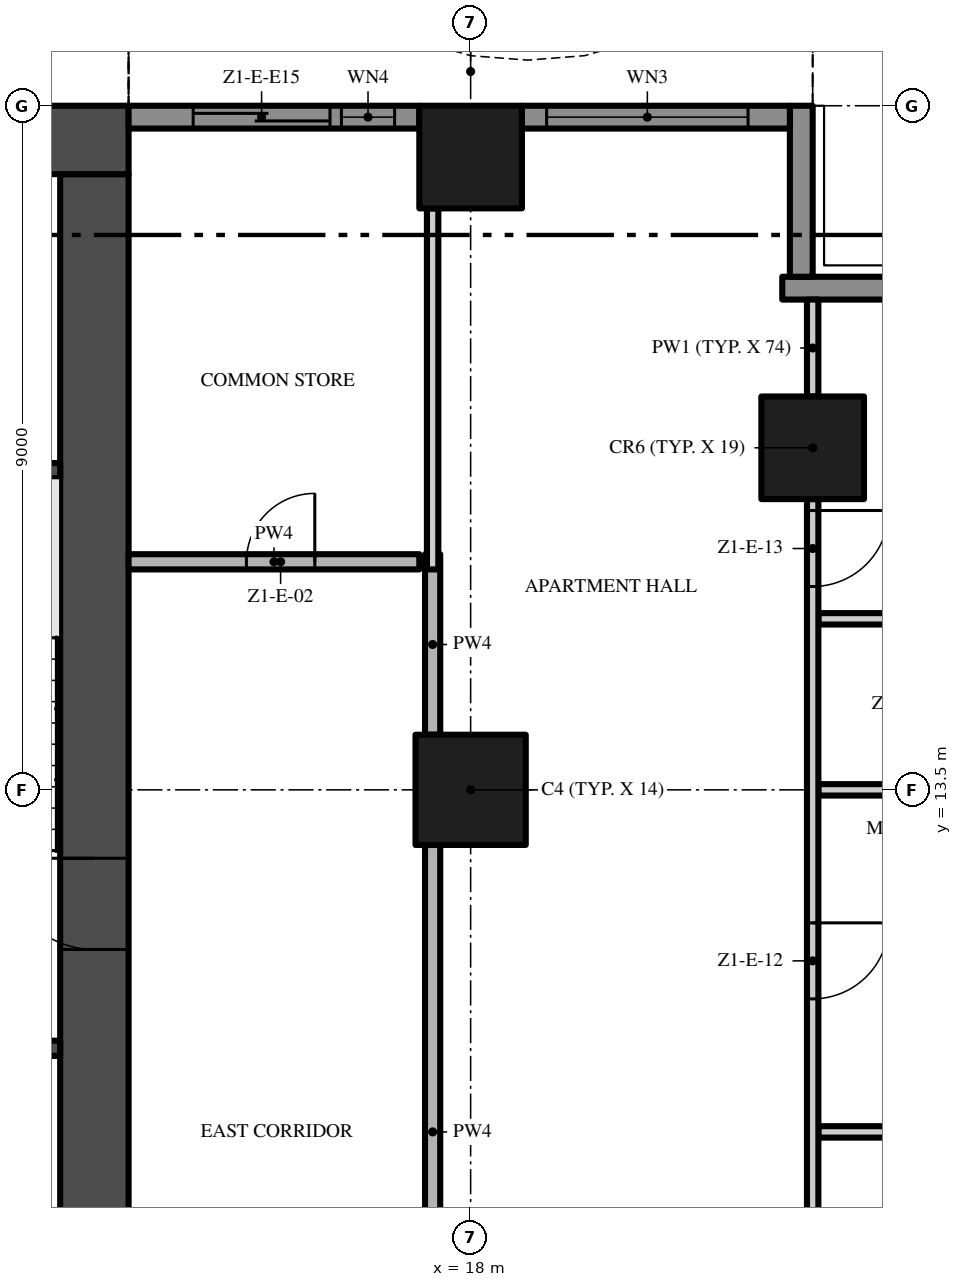
"""IFC4 building model, lengths in metres.
Left out: names, types, materials, properties, quantities, classifications, styles, units other than length and angle.
Written with IfcOpenShell. Run it as: python <this file> out.ifc"""

import sys

from ifc_helpers import new_model, si_unit, direction, frame, frame_2d, origin, origin_2d, place, context, subcontext, project, spatial, polyline, rectangle, outline, extrude, element, fill, save


model = new_model("IFC4")
c1 = context("Model", 3, precision=1e-05, world=origin(), true_north=direction((0.0, 1.0)))
c2 = subcontext(c1, "Body", "Model", "MODEL_VIEW")
j1 = project(units=[si_unit("LENGTHUNIT", "METRE"), si_unit("PLANEANGLEUNIT", "RADIAN")], contexts=[c1])
p1 = place(None, origin())
s1 = spatial("IfcSite", under=j1, at=p1, CompositionType="ELEMENT")
p2 = place(p1, origin())
s2 = spatial("IfcBuilding", under=s1, at=p2, CompositionType="ELEMENT")
p3 = place(p2, frame((0.0, 0.0, 60.6)))
s3 = spatial("IfcBuildingStorey", under=s2, at=p3, CompositionType="ELEMENT", Elevation=60.6)
p4 = place(p3, frame((13.05, 5.4, -0.3), z_axis=(0.0, 0.0, 1.0), x_axis=(0.0, 1.0, 0.0)))
e1 = element("IfcWall", 1, at=p4, inside=s3, PredefinedType="SHEAR", context=c2, shape_type="SweptSolid", body=[
    extrude(rectangle(XDim=16.2, YDim=0.9, at=frame_2d((8.1, 0.0))), origin(), (0.0, 0.0, 1.0), 3.8),
])
p5 = place(p4, frame((6.0, 0.0, 0.3)))
e2 = element("IfcOpeningElement", 2, at=p5, cuts=e1, PredefinedType="OPENING", context=c2, shape_type="SweptSolid", body=[
    extrude(rectangle(XDim=1.2, YDim=2.2, at=frame_2d((0.6, 1.1))), frame((0.0, 0.46, 0.0), z_axis=(0.0, -1.0, 0.0), x_axis=(1.0, 0.0, 0.0)), (0.0, 0.0, 1.0), 0.92),
])
p6 = place(p3, frame((13.5, 22.05, -0.3), z_axis=(0.0, 0.0, 1.0), x_axis=(-1.0, 0.0, 0.0)))
e3 = element("IfcWall", 3, at=p6, inside=s3, PredefinedType="SHEAR", context=c2, shape_type="SweptSolid", body=[
    extrude(rectangle(XDim=27.0, YDim=0.9, at=frame_2d((13.5, 0.0))), origin(), (0.0, 0.0, 1.0), 3.8),
])
p7 = place(p3, frame((18.0, 13.5, 0.0), z_axis=(0.0, 0.0, 1.0), x_axis=(1.0, 0.0, 0.0)))
e4 = element("IfcColumn", 4, at=p7, inside=s3, PredefinedType="COLUMN", context=c2, shape_type="SweptSolid", body=[
    extrude(rectangle(XDim=1.45, YDim=1.45, at=origin_2d()), origin(), (0.0, 0.0, 1.0), 3.5),
])
for number, where, z_axis, x_axis in (
    (5, (18.0, 21.825, 0.0), (0.0, 0.0, 1.0), (1.0, 0.0, 0.0)),
    (6, (22.5, 18.0, 0.0), (0.0, 0.0, 1.0), (1.0, 0.0, 0.0)),
):
    element("IfcColumn", number, at=place(p3, frame(where, z_axis=z_axis, x_axis=x_axis)), inside=s3, PredefinedType="COLUMN", context=c2, shape_type="SweptSolid", body=[
        extrude(rectangle(XDim=1.35, YDim=1.35, at=origin_2d()), origin(), (0.0, 0.0, 1.0), 3.5),
    ])
p8 = place(p3, frame((22.1, 20.1, 0.0), z_axis=(0.0, 0.0, 1.0), x_axis=(1.0, 0.0, 0.0)))
e7 = element("IfcWall", 7, at=p8, inside=s3, PredefinedType="SOLIDWALL", context=c2, shape_type="SweptSolid", body=[
    extrude(rectangle(XDim=2.35, YDim=0.3, at=frame_2d((1.175, 0.0))), origin(), (0.0, 0.0, 1.0), 3.5),
])
p9 = place(p3, frame((22.35, 22.5, 0.0), z_axis=(0.0, 0.0, 1.0), x_axis=(0.0, -1.0, 0.0)))
e8 = element("IfcWall", 8, at=p9, inside=s3, PredefinedType="SOLIDWALL", context=c2, shape_type="SweptSolid", body=[
    extrude(rectangle(XDim=2.25, YDim=0.3, at=frame_2d((1.125, 0.0))), origin(), (0.0, 0.0, 1.0), 3.5),
])
p10 = place(p3, frame((18.675, 22.35, 0.0), z_axis=(0.0, 0.0, 1.0), x_axis=(1.0, 0.0, 0.0)))
e9 = element("IfcWall", 9, at=p10, inside=s3, PredefinedType="SOLIDWALL", context=c2, shape_type="SweptSolid", body=[
    extrude(rectangle(XDim=3.525, YDim=0.3, at=frame_2d((1.762, 0.0))), origin(), (0.0, 0.0, 1.0), 3.5),
])
p11 = place(p10, frame((0.325, 0.0, 0.45)))
e10 = element("IfcOpeningElement", 10, at=p11, cuts=e9, PredefinedType="OPENING", context=c2, shape_type="SweptSolid", body=[
    extrude(rectangle(XDim=2.65, YDim=2.65, at=frame_2d((1.325, 1.325))), frame((0.0, 0.16, 0.0), z_axis=(0.0, -1.0, 0.0), x_axis=(1.0, 0.0, 0.0)), (0.0, 0.0, 1.0), 0.32),
])
p12 = place(p3, frame((13.5, 22.35, 0.0), z_axis=(0.0, 0.0, 1.0), x_axis=(1.0, 0.0, 0.0)))
e11 = element("IfcWall", 11, at=p12, inside=s3, PredefinedType="SOLIDWALL", context=c2, shape_type="SweptSolid", body=[
    extrude(rectangle(XDim=3.825, YDim=0.3, at=frame_2d((1.913, 0.0))), origin(), (0.0, 0.0, 1.0), 3.5),
])
p13 = place(p12, frame((2.8, 0.0, 0.45)))
e12 = element("IfcOpeningElement", 12, at=p13, cuts=e11, PredefinedType="OPENING", context=c2, shape_type="SweptSolid", body=[
    extrude(rectangle(XDim=0.7, YDim=2.65, at=frame_2d((0.35, 1.325))), frame((0.0, 0.16, 0.0), z_axis=(0.0, -1.0, 0.0), x_axis=(1.0, 0.0, 0.0)), (0.0, 0.0, 1.0), 0.32),
])
p14 = place(p12, frame((0.85, 0.0, 0.0)))
e13 = element("IfcOpeningElement", 13, at=p14, cuts=e11, PredefinedType="OPENING", context=c2, shape_type="SweptSolid", body=[
    extrude(rectangle(XDim=1.8, YDim=2.4, at=frame_2d((0.9, 1.2))), frame((0.0, 0.16, 0.0), z_axis=(0.0, -1.0, 0.0), x_axis=(1.0, 0.0, 0.0)), (0.0, 0.0, 1.0), 0.32),
])
p15 = place(p3, origin())
e14 = element("IfcWall", 14, at=p15, inside=s3, PredefinedType="USERDEFINED", context=c2, shape_type="SweptSolid", body=[
    extrude(outline(polyline([(22.5, 24.3), (21.0, 23.595), (19.5, 23.159), (18.75, 23.1), (18.0, 23.159), (16.5, 23.595), (15.0, 24.3), (13.5, 25.005), (13.394, 24.779), (14.894, 24.074), (16.411, 23.36), (17.955, 22.911), (18.75, 22.849), (19.545, 22.911), (21.089, 23.36), (22.606, 24.074), (22.5, 24.3)])), origin(), (0.0, 0.0, 1.0), 0.9),
])
for number, where, z_axis, x_axis in (
    (15, (9.65, 10.1, 0.0), (0.0, 0.0, 1.0), (1.0, 0.0, 0.0)),
    (16, (9.65, 17.7, 0.0), (0.0, 0.0, 1.0), (1.0, 0.0, 0.0)),
):
    element("IfcWall", number, at=place(p3, frame(where, z_axis=z_axis, x_axis=x_axis)), inside=s3, PredefinedType="SHEAR", context=c2, shape_type="SweptSolid", body=[
        extrude(rectangle(XDim=2.95, YDim=0.2, at=frame_2d((1.475, 0.0))), origin(), (0.0, 0.0, 1.0), 3.5),
    ])
p16 = place(p3, frame((22.575, 9.0, 0.0), z_axis=(0.0, 0.0, 1.0), x_axis=(1.0, 0.0, 0.0)))
e17 = element("IfcWall", 17, at=p16, inside=s3, PredefinedType="PARTITIONING", context=c2, shape_type="SweptSolid", body=[
    extrude(rectangle(XDim=4.125, YDim=0.15, at=frame_2d((2.062, 0.0))), origin(), (0.0, 0.0, 1.0), 3.5),
])
p17 = place(p3, frame((22.575, 13.5, 0.0), z_axis=(0.0, 0.0, 1.0), x_axis=(1.0, 0.0, 0.0)))
e18 = element("IfcWall", 18, at=p17, inside=s3, PredefinedType="PARTITIONING", context=c2, shape_type="SweptSolid", body=[
    extrude(rectangle(XDim=3.075, YDim=0.15, at=frame_2d((1.538, 0.0))), origin(), (0.0, 0.0, 1.0), 3.5),
])
p18 = place(p3, frame((22.575, 15.75, 0.0), z_axis=(0.0, 0.0, 1.0), x_axis=(1.0, 0.0, 0.0)))
e19 = element("IfcWall", 19, at=p18, inside=s3, PredefinedType="PARTITIONING", context=c2, shape_type="SweptSolid", body=[
    extrude(rectangle(XDim=1.875, YDim=0.15, at=frame_2d((0.938, 0.0))), origin(), (0.0, 0.0, 1.0), 3.5),
])
p19 = place(p3, frame((13.5, 16.5, 0.0), z_axis=(0.0, 0.0, 1.0), x_axis=(1.0, 0.0, 0.0)))
e20 = element("IfcWall", 20, at=p19, inside=s3, PredefinedType="PARTITIONING", context=c2, shape_type="SweptSolid", body=[
    extrude(rectangle(XDim=3.825, YDim=0.2, at=frame_2d((1.913, 0.0))), origin(), (0.0, 0.0, 1.0), 3.5),
])
p20 = place(p19, frame((1.55, 0.0, 0.0)))
e21 = element("IfcOpeningElement", 21, at=p20, cuts=e20, PredefinedType="OPENING", context=c2, shape_type="SweptSolid", body=[
    extrude(rectangle(XDim=0.9, YDim=2.1, at=frame_2d((0.45, 1.05))), frame((0.0, 0.11, 0.0), z_axis=(0.0, -1.0, 0.0), x_axis=(1.0, 0.0, 0.0)), (0.0, 0.0, 1.0), 0.22),
])
p21 = place(p3, frame((17.5, 12.775, 0.0), z_axis=(0.0, 0.0, 1.0), x_axis=(0.0, -1.0, 0.0)))
e22 = element("IfcWall", 22, at=p21, inside=s3, PredefinedType="PARTITIONING", context=c2, shape_type="SweptSolid", body=[
    extrude(rectangle(XDim=7.55, YDim=0.2, at=frame_2d((3.775, 0.0))), origin(), (0.0, 0.0, 1.0), 3.5),
])
p22 = place(p21, frame((5.4, 0.0, 0.0)))
e23 = element("IfcOpeningElement", 23, at=p22, cuts=e22, PredefinedType="OPENING", context=c2, shape_type="SweptSolid", body=[
    extrude(rectangle(XDim=1.2, YDim=2.4, at=frame_2d((0.6, 1.2))), frame((0.0, 0.11, 0.0), z_axis=(0.0, -1.0, 0.0), x_axis=(1.0, 0.0, 0.0)), (0.0, 0.0, 1.0), 0.22),
])
p23 = place(p3, frame((17.5, 14.225, 0.0), z_axis=(0.0, 0.0, 1.0), x_axis=(0.0, 1.0, 0.0)))
e24 = element("IfcWall", 24, at=p23, inside=s3, PredefinedType="PARTITIONING", context=c2, shape_type="SweptSolid", body=[
    extrude(rectangle(XDim=2.375, YDim=0.2, at=frame_2d((1.188, 0.0))), origin(), (0.0, 0.0, 1.0), 3.5),
])
p24 = place(p3, frame((17.5, 16.4, 0.0), z_axis=(0.0, 0.0, 1.0), x_axis=(0.0, 1.0, 0.0)))
e25 = element("IfcWall", 25, at=p24, inside=s3, PredefinedType="PARTITIONING", context=c2, shape_type="SweptSolid", body=[
    extrude(rectangle(XDim=4.75, YDim=0.15, at=frame_2d((2.375, 0.0))), origin(), (0.0, 0.0, 1.0), 3.5),
])
p25 = place(p3, frame((22.5, 17.325, 0.0), z_axis=(0.0, 0.0, 1.0), x_axis=(0.0, -1.0, 0.0)))
e26 = element("IfcWall", 26, at=p25, inside=s3, PredefinedType="PARTITIONING", context=c2, shape_type="SweptSolid", body=[
    extrude(rectangle(XDim=17.225, YDim=0.15, at=frame_2d((8.613, 0.0))), origin(), (0.0, 0.0, 1.0), 3.5),
])
p26 = place(p25, frame((13.025, 0.0, 0.0)))
e27 = element("IfcOpeningElement", 27, at=p26, cuts=e26, PredefinedType="OPENING", context=c2, shape_type="SweptSolid", body=[
    extrude(rectangle(XDim=1.8, YDim=2.4, at=frame_2d((0.9, 1.2))), frame((0.0, 0.085, 0.0), z_axis=(0.0, -1.0, 0.0), x_axis=(1.0, 0.0, 0.0)), (0.0, 0.0, 1.0), 0.17),
])
p27 = place(p25, frame((5.575, 0.0, 0.0)))
e28 = element("IfcOpeningElement", 28, at=p27, cuts=e26, PredefinedType="OPENING", context=c2, shape_type="SweptSolid", body=[
    extrude(rectangle(XDim=1.0, YDim=2.4, at=frame_2d((0.5, 1.2))), frame((0.0, 0.085, 0.0), z_axis=(0.0, -1.0, 0.0), x_axis=(1.0, 0.0, 0.0)), (0.0, 0.0, 1.0), 0.17),
])
p28 = place(p25, frame((0.15, 0.0, 0.0)))
e29 = element("IfcOpeningElement", 29, at=p28, cuts=e26, PredefinedType="OPENING", context=c2, shape_type="SweptSolid", body=[
    extrude(rectangle(XDim=1.0, YDim=2.4, at=frame_2d((0.5, 1.2))), frame((0.0, 0.085, 0.0), z_axis=(0.0, -1.0, 0.0), x_axis=(1.0, 0.0, 0.0)), (0.0, 0.0, 1.0), 0.17),
])
p29 = place(p3, frame((22.5, 18.675, 0.0), z_axis=(0.0, 0.0, 1.0), x_axis=(0.0, 1.0, 0.0)))
e30 = element("IfcWall", 30, at=p29, inside=s3, PredefinedType="PARTITIONING", context=c2, shape_type="SweptSolid", body=[
    extrude(rectangle(XDim=1.275, YDim=0.15, at=frame_2d((0.637, 0.0))), origin(), (0.0, 0.0, 1.0), 3.5),
])
p30 = place(p11, origin())
e31 = element("IfcWindow", 31, at=p30, inside=s3, PartitioningType="SINGLE_PANEL", PredefinedType="WINDOW", context=c2, shape_type="SweptSolid", body=[
    extrude(rectangle(XDim=2.65, YDim=2.65, at=frame_2d((1.325, 1.325))), frame((0.0, 0.03, 0.0), z_axis=(0.0, -1.0, 0.0), x_axis=(1.0, 0.0, 0.0)), (0.0, 0.0, 1.0), 0.06),
])
fill(e10, e31)
p31 = place(p13, origin())
e32 = element("IfcWindow", 32, at=p31, inside=s3, PartitioningType="SINGLE_PANEL", PredefinedType="WINDOW", context=c2, shape_type="SweptSolid", body=[
    extrude(rectangle(XDim=0.7, YDim=2.65, at=frame_2d((0.35, 1.325))), frame((0.0, 0.03, 0.0), z_axis=(0.0, -1.0, 0.0), x_axis=(1.0, 0.0, 0.0)), (0.0, 0.0, 1.0), 0.06),
])
fill(e12, e32)
p32 = place(p14, origin())
e33 = element("IfcDoor", 33, at=p32, inside=s3, OperationType="SINGLE_SWING_LEFT", PredefinedType="DOOR", context=c2, shape_type="SweptSolid", body=[
    extrude(rectangle(XDim=1.8, YDim=2.4, at=frame_2d((0.9, 1.2))), frame((0.0, 0.025, 0.0), z_axis=(0.0, -1.0, 0.0), x_axis=(1.0, 0.0, 0.0)), (0.0, 0.0, 1.0), 0.05),
])
fill(e13, e33)
p33 = place(p5, frame((1.2, 0.0, 0.0), z_axis=(0.0, 0.0, 1.0), x_axis=(-1.0, 0.0, 0.0)))
e34 = element("IfcDoor", 34, at=p33, inside=s3, OperationType="SINGLE_SWING_LEFT", PredefinedType="DOOR", context=c2, shape_type="SweptSolid", body=[
    extrude(rectangle(XDim=1.2, YDim=2.2, at=frame_2d((0.6, 1.1))), frame((0.0, 0.025, 0.0), z_axis=(0.0, -1.0, 0.0), x_axis=(1.0, 0.0, 0.0)), (0.0, 0.0, 1.0), 0.05),
])
fill(e2, e34)
p34 = place(p20, origin())
e35 = element("IfcDoor", 35, at=p34, inside=s3, OperationType="SINGLE_SWING_RIGHT", PredefinedType="DOOR", context=c2, shape_type="SweptSolid", body=[
    extrude(rectangle(XDim=0.9, YDim=2.1, at=frame_2d((0.45, 1.05))), frame((0.0, 0.025, 0.0), z_axis=(0.0, -1.0, 0.0), x_axis=(1.0, 0.0, 0.0)), (0.0, 0.0, 1.0), 0.05),
])
fill(e21, e35)
p35 = place(p27, origin())
e36 = element("IfcDoor", 36, at=p35, inside=s3, OperationType="SINGLE_SWING_LEFT", PredefinedType="DOOR", context=c2, shape_type="SweptSolid", body=[
    extrude(rectangle(XDim=1.0, YDim=2.4, at=frame_2d((0.5, 1.2))), frame((0.0, 0.025, 0.0), z_axis=(0.0, -1.0, 0.0), x_axis=(1.0, 0.0, 0.0)), (0.0, 0.0, 1.0), 0.05),
])
fill(e28, e36)
p36 = place(p28, origin())
e37 = element("IfcDoor", 37, at=p36, inside=s3, OperationType="SINGLE_SWING_LEFT", PredefinedType="DOOR", context=c2, shape_type="SweptSolid", body=[
    extrude(rectangle(XDim=1.0, YDim=2.4, at=frame_2d((0.5, 1.2))), frame((0.0, 0.025, 0.0), z_axis=(0.0, -1.0, 0.0), x_axis=(1.0, 0.0, 0.0)), (0.0, 0.0, 1.0), 0.05),
])
fill(e29, e37)
save(model, sys.argv[1])
